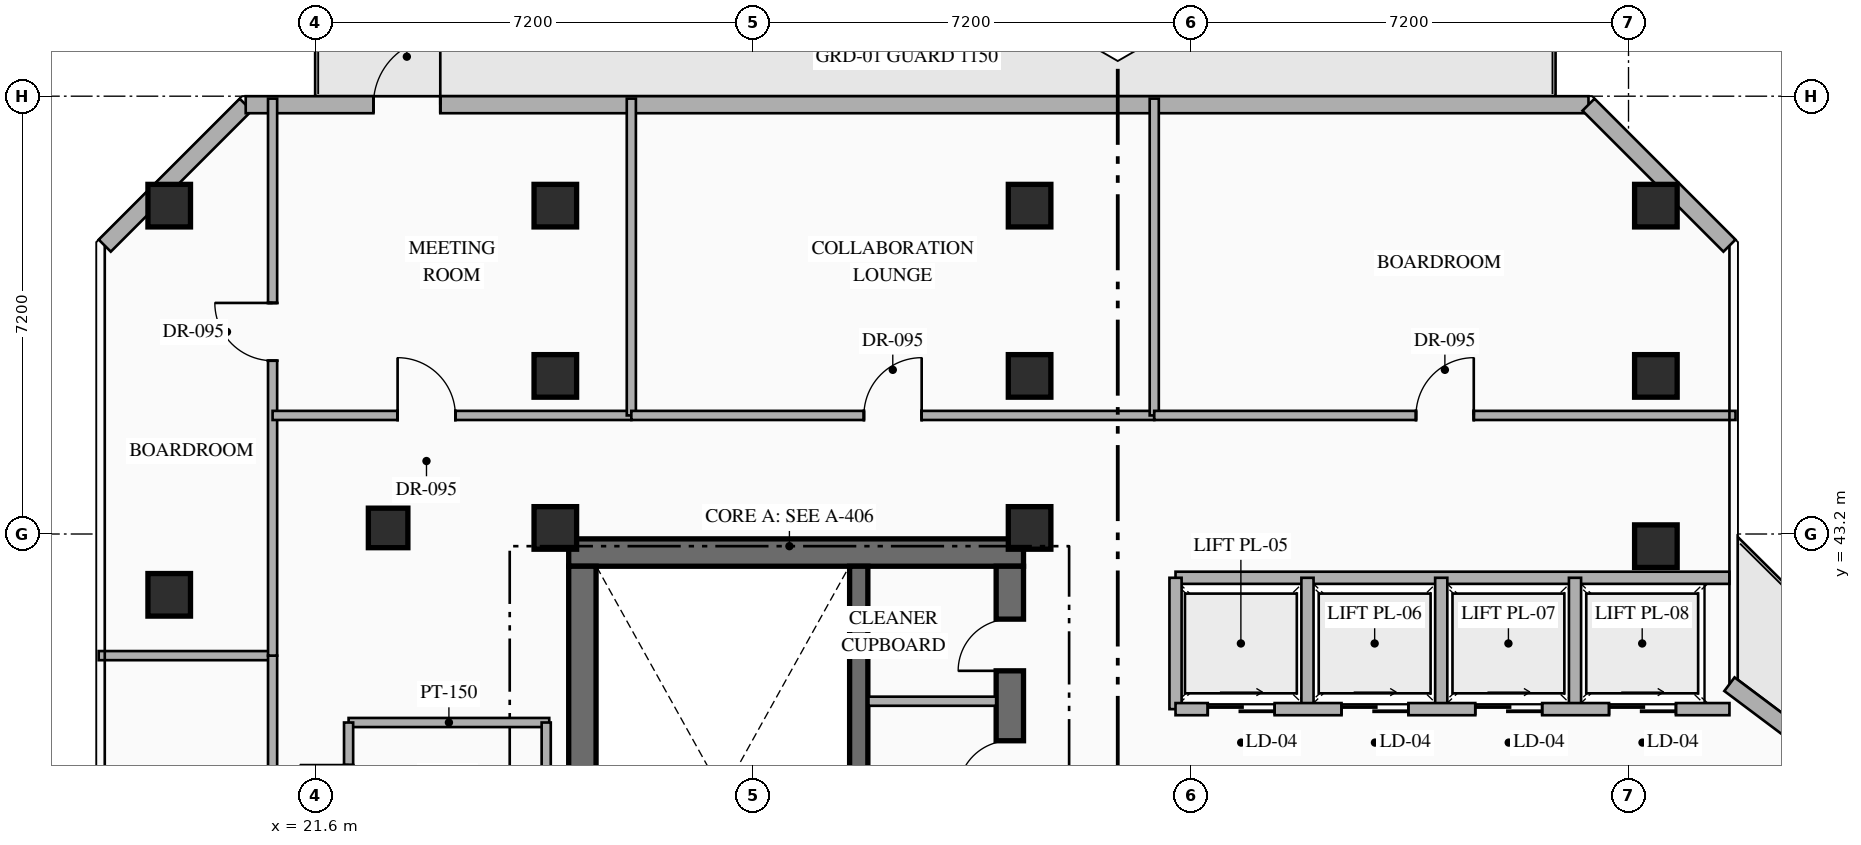
"""IFC4 building model, lengths in metres.
Left out: names, types, materials, properties, quantities, classifications, styles, units other than length and angle.
Written with IfcOpenShell. Run it as: python <this file> out.ifc"""

import sys

from ifc_helpers import new_model, si_unit, direction, frame, frame_2d, origin, origin_2d, place, context, subcontext, project, spatial, rectangle, hollow_rectangle, extrude, element, fill, save


model = new_model("IFC4")
c1 = context("Model", 3, precision=1e-05, world=origin(), true_north=direction((0.0, 1.0)))
c2 = subcontext(c1, "Body", "Model", "MODEL_VIEW")
j1 = project(units=[si_unit("LENGTHUNIT", "METRE"), si_unit("PLANEANGLEUNIT", "RADIAN")], contexts=[c1])
p1 = place(None, origin())
s1 = spatial("IfcSite", under=j1, at=p1, CompositionType="ELEMENT")
p2 = place(p1, origin())
s2 = spatial("IfcBuilding", under=s1, at=p2, CompositionType="ELEMENT")
p3 = place(p2, frame((0.0, 0.0, 216.75)))
s3 = spatial("IfcBuildingStorey", under=s2, at=p3, CompositionType="ELEMENT", Elevation=216.75)
p4 = place(p3, frame((25.77, 42.895, 0.0), z_axis=(0.0, 0.0, 1.0), x_axis=(1.0, 0.0, 0.0)))
e1 = element("IfcWall", 1, at=p4, inside=s3, PredefinedType="SHEAR", context=c2, shape_type="SweptSolid", body=[
    extrude(rectangle(XDim=7.48, YDim=0.45, at=frame_2d((3.74, 0.0))), origin(), (0.0, 0.0, 1.0), 3.6),
])
p5 = place(p3, frame((25.995, 33.19, 0.0), z_axis=(0.0, 0.0, 1.0), x_axis=(0.0, 1.0, 0.0)))
e2 = element("IfcWall", 2, at=p5, inside=s3, PredefinedType="SHEAR", context=c2, shape_type="SweptSolid", body=[
    extrude(rectangle(XDim=9.48, YDim=0.45, at=frame_2d((4.74, 0.0))), origin(), (0.0, 0.0, 1.0), 3.6),
])
p6 = place(p3, frame((33.025, 33.19, 0.0), z_axis=(0.0, 0.0, 1.0), x_axis=(0.0, 1.0, 0.0)))
e3 = element("IfcWall", 3, at=p6, inside=s3, PredefinedType="SHEAR", context=c2, shape_type="SweptSolid", body=[
    extrude(rectangle(XDim=9.48, YDim=0.45, at=frame_2d((4.74, 0.0))), origin(), (0.0, 0.0, 1.0), 3.6),
])
p7 = place(p6, frame((3.61, 0.0, 0.0)))
e4 = element("IfcOpeningElement", 4, at=p7, cuts=e3, PredefinedType="OPENING", context=c2, shape_type="SweptSolid", body=[
    extrude(rectangle(XDim=0.85, YDim=2.08, at=frame_2d((0.425, 1.04))), frame((0.0, 0.235, 0.0), z_axis=(0.0, -1.0, 0.0), x_axis=(1.0, 0.0, 0.0)), (0.0, 0.0, 1.0), 0.47),
])
p8 = place(p6, frame((5.76, 0.0, 0.0)))
e5 = element("IfcOpeningElement", 5, at=p8, cuts=e3, PredefinedType="OPENING", context=c2, shape_type="SweptSolid", body=[
    extrude(rectangle(XDim=0.85, YDim=2.08, at=frame_2d((0.425, 1.04))), frame((0.0, 0.235, 0.0), z_axis=(0.0, -1.0, 0.0), x_axis=(1.0, 0.0, 0.0)), (0.0, 0.0, 1.0), 0.47),
])
p9 = place(p6, frame((7.76, 0.0, 0.0)))
e6 = element("IfcOpeningElement", 6, at=p9, cuts=e3, PredefinedType="OPENING", context=c2, shape_type="SweptSolid", body=[
    extrude(rectangle(XDim=0.85, YDim=2.08, at=frame_2d((0.425, 1.04))), frame((0.0, 0.235, 0.0), z_axis=(0.0, -1.0, 0.0), x_axis=(1.0, 0.0, 0.0)), (0.0, 0.0, 1.0), 0.47),
])
p10 = place(p3, frame((30.54, 33.19, 0.0), z_axis=(0.0, 0.0, 1.0), x_axis=(0.0, 1.0, 0.0)))
e7 = element("IfcWall", 7, at=p10, inside=s3, PredefinedType="SHEAR", context=c2, shape_type="SweptSolid", body=[
    extrude(rectangle(XDim=9.48, YDim=0.3, at=frame_2d((4.74, 0.0))), origin(), (0.0, 0.0, 1.0), 3.6),
])
for number, where, z_axis, x_axis in (
    (8, (25.55, 43.3, 0.0), (0.0, 0.0, 1.0), (1.0, 0.0, 0.0)),
    (9, (33.35, 43.3, 0.0), (0.0, 0.0, 1.0), (1.0, 0.0, 0.0)),
    (10, (43.65, 43.0, 0.0), (0.0, 0.0, 1.0), (1.0, 0.0, 0.0)),
    (11, (25.55, 45.8, 0.0), (0.0, 0.0, 1.0), (1.0, 0.0, 0.0)),
    (12, (33.35, 45.8, 0.0), (0.0, 0.0, 1.0), (1.0, 0.0, 0.0)),
    (13, (43.65, 45.8, 0.0), (0.0, 0.0, 1.0), (1.0, 0.0, 0.0)),
    (14, (19.2, 48.6, 0.0), (0.0, 0.0, 1.0), (1.0, 0.0, 0.0)),
    (15, (25.55, 48.6, 0.0), (0.0, 0.0, 1.0), (1.0, 0.0, 0.0)),
    (16, (33.35, 48.6, 0.0), (0.0, 0.0, 1.0), (1.0, 0.0, 0.0)),
    (17, (43.65, 48.6, 0.0), (0.0, 0.0, 1.0), (1.0, 0.0, 0.0)),
    (18, (19.2, 42.2, 0.0), (0.0, 0.0, 1.0), (1.0, 0.0, 0.0)),
):
    element("IfcColumn", number, at=place(p3, frame(where, z_axis=z_axis, x_axis=x_axis)), inside=s3, PredefinedType="COLUMN", context=c2, shape_type="SweptSolid", body=[
        extrude(hollow_rectangle(XDim=0.7, YDim=0.7, WallThickness=0.028, at=origin_2d()), origin(), (0.0, 0.0, 1.0), 3.6),
    ])
p11 = place(p3, frame((22.8, 43.3, 0.0), z_axis=(0.0, 0.0, 1.0), x_axis=(1.0, 0.0, 0.0)))
e19 = element("IfcColumn", 19, at=p11, inside=s3, PredefinedType="COLUMN", context=c2, shape_type="SweptSolid", body=[
    extrude(hollow_rectangle(XDim=0.65, YDim=0.65, WallThickness=0.025, at=origin_2d()), origin(), (0.0, 0.0, 1.0), 3.6),
])
p12 = place(p3, frame((44.86, 40.73, 0.0), z_axis=(0.0, 0.0, 1.0), x_axis=(0.800007624502, -0.599989833863, 0.0)))
e20 = element("IfcWall", 20, at=p12, inside=s3, PredefinedType="STANDARD", context=c2, shape_type="SweptSolid", body=[
    extrude(rectangle(XDim=19.212, YDim=0.28, at=frame_2d((9.606, 0.0))), origin(), (0.0, 0.0, 1.0), 3.35),
])
p13 = place(p12, frame((1.755, 0.0, 0.0)))
e21 = element("IfcOpeningElement", 21, at=p13, cuts=e20, PredefinedType="OPENING", context=c2, shape_type="SweptSolid", body=[
    extrude(rectangle(XDim=1.1, YDim=2.2, at=frame_2d((0.55, 1.1))), frame((0.0, 0.15, 0.0), z_axis=(0.0, -1.0, 0.0), x_axis=(1.0, 0.0, 0.0)), (0.0, 0.0, 1.0), 0.3),
])
p14 = place(p12, frame((13.509, 0.0, 0.85)))
e22 = element("IfcOpeningElement", 22, at=p14, cuts=e20, PredefinedType="OPENING", context=c2, shape_type="SweptSolid", body=[
    extrude(rectangle(XDim=1.8, YDim=2.1, at=frame_2d((0.9, 1.05))), frame((0.0, 0.15, 0.0), z_axis=(0.0, -1.0, 0.0), x_axis=(1.0, 0.0, 0.0)), (0.0, 0.0, 1.0), 0.3),
])
p15 = place(p3, frame((18.14, 47.942, 0.0), z_axis=(0.0, 0.0, 1.0), x_axis=(0.707106781187, 0.707106781187, 0.0)))
e23 = element("IfcWall", 23, at=p15, inside=s3, PredefinedType="STANDARD", context=c2, shape_type="SweptSolid", body=[
    extrude(rectangle(XDim=3.278, YDim=0.28, at=frame_2d((1.639, 0.0))), origin(), (0.0, 0.0, 1.0), 3.35),
])
p16 = place(p3, frame((20.458, 50.26, 0.0), z_axis=(0.0, 0.0, 1.0), x_axis=(1.0, 0.0, 0.0)))
e24 = element("IfcWall", 24, at=p16, inside=s3, PredefinedType="STANDARD", context=c2, shape_type="SweptSolid", body=[
    extrude(rectangle(XDim=22.084, YDim=0.28, at=frame_2d((11.042, 0.0))), origin(), (0.0, 0.0, 1.0), 3.35),
])
p17 = place(p16, frame((2.1, 0.0, 0.0)))
e25 = element("IfcOpeningElement", 25, at=p17, cuts=e24, PredefinedType="OPENING", context=c2, shape_type="SweptSolid", body=[
    extrude(rectangle(XDim=1.1, YDim=2.2, at=frame_2d((0.55, 1.1))), frame((0.0, 0.15, 0.0), z_axis=(0.0, -1.0, 0.0), x_axis=(1.0, 0.0, 0.0)), (0.0, 0.0, 1.0), 0.3),
])
p18 = place(p3, frame((42.542, 50.26, 0.0), z_axis=(0.0, 0.0, 1.0), x_axis=(0.707106781187, -0.707106781187, 0.0)))
e26 = element("IfcWall", 26, at=p18, inside=s3, PredefinedType="STANDARD", context=c2, shape_type="SweptSolid", body=[
    extrude(rectangle(XDim=3.278, YDim=0.28, at=frame_2d((1.639, 0.0))), origin(), (0.0, 0.0, 1.0), 3.35),
])
p19 = place(p3, frame((30.7, 40.45, 0.0), z_axis=(0.0, 0.0, 1.0), x_axis=(1.0, 0.0, 0.0)))
e27 = element("IfcWall", 27, at=p19, inside=s3, PredefinedType="PARTITIONING", context=c2, shape_type="SweptSolid", body=[
    extrude(rectangle(XDim=2.1, YDim=0.15, at=frame_2d((1.05, 0.0))), origin(), (0.0, 0.0, 1.0), 3.35),
])
p20 = place(p3, frame((35.75, 42.48, 0.0), z_axis=(0.0, 0.0, 1.0), x_axis=(1.0, 0.0, 0.0)))
e28 = element("IfcWall", 28, at=p20, inside=s3, PredefinedType="STANDARD", context=c2, shape_type="SweptSolid", body=[
    extrude(rectangle(XDim=9.11, YDim=0.2, at=frame_2d((4.555, 0.0))), origin(), (0.0, 0.0, 1.0), 3.35),
])
for number, where, z_axis, x_axis in (
    (29, (35.75, 40.32, 0.0), (0.0, 0.0, 1.0), (0.0, 1.0, 0.0)),
    (30, (37.92, 40.32, 0.0), (0.0, 0.0, 1.0), (0.0, 1.0, 0.0)),
    (31, (40.12, 40.32, 0.0), (0.0, 0.0, 1.0), (0.0, 1.0, 0.0)),
    (32, (42.32, 40.32, 0.0), (0.0, 0.0, 1.0), (0.0, 1.0, 0.0)),
):
    element("IfcWall", number, at=place(p3, frame(where, z_axis=z_axis, x_axis=x_axis)), inside=s3, PredefinedType="STANDARD", context=c2, shape_type="SweptSolid", body=[
        extrude(rectangle(XDim=2.16, YDim=0.2, at=frame_2d((1.08, 0.0))), origin(), (0.0, 0.0, 1.0), 3.35),
    ])
p21 = place(p3, frame((35.75, 40.32, 0.0), z_axis=(0.0, 0.0, 1.0), x_axis=(1.0, 0.0, 0.0)))
e33 = element("IfcWall", 33, at=p21, inside=s3, PredefinedType="STANDARD", context=c2, shape_type="SweptSolid", body=[
    extrude(rectangle(XDim=9.11, YDim=0.2, at=frame_2d((4.555, 0.0))), origin(), (0.0, 0.0, 1.0), 3.35),
])
p22 = place(p21, frame((0.53, 0.0, 0.0)))
e34 = element("IfcOpeningElement", 34, at=p22, cuts=e33, PredefinedType="OPENING", context=c2, shape_type="SweptSolid", body=[
    extrude(rectangle(XDim=1.1, YDim=2.18, at=frame_2d((0.55, 1.09))), frame((0.0, 0.11, 0.0), z_axis=(0.0, -1.0, 0.0), x_axis=(1.0, 0.0, 0.0)), (0.0, 0.0, 1.0), 0.22),
])
p23 = place(p21, frame((2.73, 0.0, 0.0)))
e35 = element("IfcOpeningElement", 35, at=p23, cuts=e33, PredefinedType="OPENING", context=c2, shape_type="SweptSolid", body=[
    extrude(rectangle(XDim=1.1, YDim=2.18, at=frame_2d((0.55, 1.09))), frame((0.0, 0.11, 0.0), z_axis=(0.0, -1.0, 0.0), x_axis=(1.0, 0.0, 0.0)), (0.0, 0.0, 1.0), 0.22),
])
p24 = place(p21, frame((4.93, 0.0, 0.0)))
e36 = element("IfcOpeningElement", 36, at=p24, cuts=e33, PredefinedType="OPENING", context=c2, shape_type="SweptSolid", body=[
    extrude(rectangle(XDim=1.1, YDim=2.18, at=frame_2d((0.55, 1.09))), frame((0.0, 0.11, 0.0), z_axis=(0.0, -1.0, 0.0), x_axis=(1.0, 0.0, 0.0)), (0.0, 0.0, 1.0), 0.22),
])
p25 = place(p21, frame((7.13, 0.0, 0.0)))
e37 = element("IfcOpeningElement", 37, at=p25, cuts=e33, PredefinedType="OPENING", context=c2, shape_type="SweptSolid", body=[
    extrude(rectangle(XDim=1.1, YDim=2.18, at=frame_2d((0.55, 1.09))), frame((0.0, 0.11, 0.0), z_axis=(0.0, -1.0, 0.0), x_axis=(1.0, 0.0, 0.0)), (0.0, 0.0, 1.0), 0.22),
])
p26 = place(p3, frame((22.15, 40.1, 0.0), z_axis=(0.0, 0.0, 1.0), x_axis=(1.0, 0.0, 0.0)))
e38 = element("IfcWall", 38, at=p26, inside=s3, PredefinedType="PARTITIONING", context=c2, shape_type="SweptSolid", body=[
    extrude(rectangle(XDim=3.3, YDim=0.15, at=frame_2d((1.65, 0.0))), origin(), (0.0, 0.0, 1.0), 3.35),
])
p27 = place(p3, frame((25.4, 33.5, 0.0), z_axis=(0.0, 0.0, 1.0), x_axis=(0.0, 1.0, 0.0)))
e39 = element("IfcWall", 39, at=p27, inside=s3, PredefinedType="PARTITIONING", context=c2, shape_type="SweptSolid", body=[
    extrude(rectangle(XDim=6.6, YDim=0.15, at=frame_2d((3.3, 0.0))), origin(), (0.0, 0.0, 1.0), 3.35),
])
p28 = place(p3, frame((22.15, 37.9, 0.0), z_axis=(0.0, 0.0, 1.0), x_axis=(0.0, 1.0, 0.0)))
e40 = element("IfcWall", 40, at=p28, inside=s3, PredefinedType="PARTITIONING", context=c2, shape_type="SweptSolid", body=[
    extrude(rectangle(XDim=2.2, YDim=0.15, at=frame_2d((1.1, 0.0))), origin(), (0.0, 0.0, 1.0), 3.35),
])
p29 = place(p28, frame((0.7, 0.0, 0.0)))
e41 = element("IfcOpeningElement", 41, at=p29, cuts=e40, PredefinedType="OPENING", context=c2, shape_type="SweptSolid", body=[
    extrude(rectangle(XDim=0.8, YDim=2.06, at=frame_2d((0.4, 1.03))), frame((0.0, 0.085, 0.0), z_axis=(0.0, -1.0, 0.0), x_axis=(1.0, 0.0, 0.0)), (0.0, 0.0, 1.0), 0.17),
])
p30 = place(p3, frame((18.04, 41.2, 0.0), z_axis=(0.0, 0.0, 1.0), x_axis=(1.0, 0.0, 0.0)))
e42 = element("IfcWall", 42, at=p30, inside=s3, PredefinedType="PARTITIONING", context=c2, shape_type="SweptSolid", body=[
    extrude(rectangle(XDim=2.86, YDim=0.15, at=frame_2d((1.43, 0.0))), origin(), (0.0, 0.0, 1.0), 3.35),
])
p31 = place(p3, frame((20.9, 31.8, 0.0), z_axis=(0.0, 0.0, 1.0), x_axis=(0.0, 1.0, 0.0)))
e43 = element("IfcWall", 43, at=p31, inside=s3, PredefinedType="PARTITIONING", context=c2, shape_type="SweptSolid", body=[
    extrude(rectangle(XDim=9.4, YDim=0.15, at=frame_2d((4.7, 0.0))), origin(), (0.0, 0.0, 1.0), 3.35),
])
p32 = place(p31, frame((0.38, 0.0, 0.0)))
e44 = element("IfcOpeningElement", 44, at=p32, cuts=e43, PredefinedType="OPENING", context=c2, shape_type="SweptSolid", body=[
    extrude(rectangle(XDim=0.95, YDim=2.15, at=frame_2d((0.475, 1.075))), frame((0.0, 0.085, 0.0), z_axis=(0.0, -1.0, 0.0), x_axis=(1.0, 0.0, 0.0)), (0.0, 0.0, 1.0), 0.17),
])
p33 = place(p3, frame((20.9, 41.2, 0.0), z_axis=(0.0, 0.0, 1.0), x_axis=(0.0, 1.0, 0.0)))
e45 = element("IfcWall", 45, at=p33, inside=s3, PredefinedType="PARTITIONING", context=c2, shape_type="SweptSolid", body=[
    extrude(rectangle(XDim=9.16, YDim=0.15, at=frame_2d((4.58, 0.0))), origin(), (0.0, 0.0, 1.0), 3.35),
])
p34 = place(p33, frame((4.85, 0.0, 0.0)))
e46 = element("IfcOpeningElement", 46, at=p34, cuts=e45, PredefinedType="OPENING", context=c2, shape_type="SweptSolid", body=[
    extrude(rectangle(XDim=0.95, YDim=2.15, at=frame_2d((0.475, 1.075))), frame((0.0, 0.085, 0.0), z_axis=(0.0, -1.0, 0.0), x_axis=(1.0, 0.0, 0.0)), (0.0, 0.0, 1.0), 0.17),
])
p35 = place(p3, frame((20.9, 45.15, 0.0), z_axis=(0.0, 0.0, 1.0), x_axis=(1.0, 0.0, 0.0)))
e47 = element("IfcWall", 47, at=p35, inside=s3, PredefinedType="PARTITIONING", context=c2, shape_type="SweptSolid", body=[
    extrude(rectangle(XDim=5.9, YDim=0.15, at=frame_2d((2.95, 0.0))), origin(), (0.0, 0.0, 1.0), 3.35),
])
p36 = place(p35, frame((2.056, 0.0, 0.0)))
e48 = element("IfcOpeningElement", 48, at=p36, cuts=e47, PredefinedType="OPENING", context=c2, shape_type="SweptSolid", body=[
    extrude(rectangle(XDim=0.95, YDim=2.15, at=frame_2d((0.475, 1.075))), frame((0.0, 0.085, 0.0), z_axis=(0.0, -1.0, 0.0), x_axis=(1.0, 0.0, 0.0)), (0.0, 0.0, 1.0), 0.17),
])
p37 = place(p3, frame((26.8, 45.15, 0.0), z_axis=(0.0, 0.0, 1.0), x_axis=(0.0, 1.0, 0.0)))
e49 = element("IfcWall", 49, at=p37, inside=s3, PredefinedType="PARTITIONING", context=c2, shape_type="SweptSolid", body=[
    extrude(rectangle(XDim=5.21, YDim=0.15, at=frame_2d((2.605, 0.0))), origin(), (0.0, 0.0, 1.0), 3.35),
])
p38 = place(p3, frame((26.8, 45.15, 0.0), z_axis=(0.0, 0.0, 1.0), x_axis=(1.0, 0.0, 0.0)))
e50 = element("IfcWall", 50, at=p38, inside=s3, PredefinedType="PARTITIONING", context=c2, shape_type="SweptSolid", body=[
    extrude(rectangle(XDim=8.6, YDim=0.15, at=frame_2d((4.3, 0.0))), origin(), (0.0, 0.0, 1.0), 3.35),
])
p39 = place(p38, frame((3.825, 0.0, 0.0)))
e51 = element("IfcOpeningElement", 51, at=p39, cuts=e50, PredefinedType="OPENING", context=c2, shape_type="SweptSolid", body=[
    extrude(rectangle(XDim=0.95, YDim=2.15, at=frame_2d((0.475, 1.075))), frame((0.0, 0.085, 0.0), z_axis=(0.0, -1.0, 0.0), x_axis=(1.0, 0.0, 0.0)), (0.0, 0.0, 1.0), 0.17),
])
p40 = place(p3, frame((35.4, 45.15, 0.0), z_axis=(0.0, 0.0, 1.0), x_axis=(0.0, 1.0, 0.0)))
e52 = element("IfcWall", 52, at=p40, inside=s3, PredefinedType="PARTITIONING", context=c2, shape_type="SweptSolid", body=[
    extrude(rectangle(XDim=5.21, YDim=0.15, at=frame_2d((2.605, 0.0))), origin(), (0.0, 0.0, 1.0), 3.35),
])
p41 = place(p3, frame((35.4, 45.15, 0.0), z_axis=(0.0, 0.0, 1.0), x_axis=(1.0, 0.0, 0.0)))
e53 = element("IfcWall", 53, at=p41, inside=s3, PredefinedType="PARTITIONING", context=c2, shape_type="SweptSolid", body=[
    extrude(rectangle(XDim=9.56, YDim=0.15, at=frame_2d((4.78, 0.0))), origin(), (0.0, 0.0, 1.0), 3.35),
])
p42 = place(p41, frame((4.305, 0.0, 0.0)))
e54 = element("IfcOpeningElement", 54, at=p42, cuts=e53, PredefinedType="OPENING", context=c2, shape_type="SweptSolid", body=[
    extrude(rectangle(XDim=0.95, YDim=2.15, at=frame_2d((0.475, 1.075))), frame((0.0, 0.085, 0.0), z_axis=(0.0, -1.0, 0.0), x_axis=(1.0, 0.0, 0.0)), (0.0, 0.0, 1.0), 0.17),
])
p43 = place(p17, origin())
e55 = element("IfcDoor", 55, at=p43, inside=s3, OperationType="SINGLE_SWING_RIGHT", PredefinedType="DOOR", context=c2, shape_type="SweptSolid", body=[
    extrude(rectangle(XDim=1.1, YDim=2.2, at=frame_2d((0.55, 1.1))), frame((0.0, 0.025, 0.0), z_axis=(0.0, -1.0, 0.0), x_axis=(1.0, 0.0, 0.0)), (0.0, 0.0, 1.0), 0.05),
])
fill(e25, e55)
p44 = place(p8, origin())
e56 = element("IfcDoor", 56, at=p44, inside=s3, OperationType="SINGLE_SWING_LEFT", PredefinedType="DOOR", context=c2, shape_type="SweptSolid", body=[
    extrude(rectangle(XDim=0.85, YDim=2.08, at=frame_2d((0.425, 1.04))), frame((0.0, 0.025, 0.0), z_axis=(0.0, -1.0, 0.0), x_axis=(1.0, 0.0, 0.0)), (0.0, 0.0, 1.0), 0.05),
])
fill(e5, e56)
p45 = place(p9, origin())
e57 = element("IfcDoor", 57, at=p45, inside=s3, OperationType="SINGLE_SWING_LEFT", PredefinedType="DOOR", context=c2, shape_type="SweptSolid", body=[
    extrude(rectangle(XDim=0.85, YDim=2.08, at=frame_2d((0.425, 1.04))), frame((0.0, 0.025, 0.0), z_axis=(0.0, -1.0, 0.0), x_axis=(1.0, 0.0, 0.0)), (0.0, 0.0, 1.0), 0.05),
])
fill(e6, e57)
p46 = place(p22, origin())
e58 = element("IfcDoor", 58, at=p46, inside=s3, OperationType="SLIDING_TO_RIGHT", PredefinedType="USERDEFINED", context=c2, shape_type="SweptSolid", body=[
    extrude(rectangle(XDim=1.1, YDim=2.18, at=frame_2d((0.55, 1.09))), frame((0.0, 0.025, 0.0), z_axis=(0.0, -1.0, 0.0), x_axis=(1.0, 0.0, 0.0)), (0.0, 0.0, 1.0), 0.05),
])
fill(e34, e58)
p47 = place(p23, origin())
e59 = element("IfcDoor", 59, at=p47, inside=s3, OperationType="SLIDING_TO_RIGHT", PredefinedType="USERDEFINED", context=c2, shape_type="SweptSolid", body=[
    extrude(rectangle(XDim=1.1, YDim=2.18, at=frame_2d((0.55, 1.09))), frame((0.0, 0.025, 0.0), z_axis=(0.0, -1.0, 0.0), x_axis=(1.0, 0.0, 0.0)), (0.0, 0.0, 1.0), 0.05),
])
fill(e35, e59)
p48 = place(p24, origin())
e60 = element("IfcDoor", 60, at=p48, inside=s3, OperationType="SLIDING_TO_RIGHT", PredefinedType="USERDEFINED", context=c2, shape_type="SweptSolid", body=[
    extrude(rectangle(XDim=1.1, YDim=2.18, at=frame_2d((0.55, 1.09))), frame((0.0, 0.025, 0.0), z_axis=(0.0, -1.0, 0.0), x_axis=(1.0, 0.0, 0.0)), (0.0, 0.0, 1.0), 0.05),
])
fill(e36, e60)
p49 = place(p25, origin())
e61 = element("IfcDoor", 61, at=p49, inside=s3, OperationType="SLIDING_TO_RIGHT", PredefinedType="USERDEFINED", context=c2, shape_type="SweptSolid", body=[
    extrude(rectangle(XDim=1.1, YDim=2.18, at=frame_2d((0.55, 1.09))), frame((0.0, 0.025, 0.0), z_axis=(0.0, -1.0, 0.0), x_axis=(1.0, 0.0, 0.0)), (0.0, 0.0, 1.0), 0.05),
])
fill(e37, e61)
p50 = place(p34, origin())
e62 = element("IfcDoor", 62, at=p50, inside=s3, OperationType="SINGLE_SWING_RIGHT", PredefinedType="DOOR", context=c2, shape_type="SweptSolid", body=[
    extrude(rectangle(XDim=0.95, YDim=2.15, at=frame_2d((0.475, 1.075))), frame((0.0, 0.025, 0.0), z_axis=(0.0, -1.0, 0.0), x_axis=(1.0, 0.0, 0.0)), (0.0, 0.0, 1.0), 0.05),
])
fill(e46, e62)
p51 = place(p36, origin())
e63 = element("IfcDoor", 63, at=p51, inside=s3, OperationType="SINGLE_SWING_LEFT", PredefinedType="DOOR", context=c2, shape_type="SweptSolid", body=[
    extrude(rectangle(XDim=0.95, YDim=2.15, at=frame_2d((0.475, 1.075))), frame((0.0, 0.025, 0.0), z_axis=(0.0, -1.0, 0.0), x_axis=(1.0, 0.0, 0.0)), (0.0, 0.0, 1.0), 0.05),
])
fill(e48, e63)
p52 = place(p39, origin())
e64 = element("IfcDoor", 64, at=p52, inside=s3, OperationType="SINGLE_SWING_RIGHT", PredefinedType="DOOR", context=c2, shape_type="SweptSolid", body=[
    extrude(rectangle(XDim=0.95, YDim=2.15, at=frame_2d((0.475, 1.075))), frame((0.0, 0.025, 0.0), z_axis=(0.0, -1.0, 0.0), x_axis=(1.0, 0.0, 0.0)), (0.0, 0.0, 1.0), 0.05),
])
fill(e51, e64)
p53 = place(p42, origin())
e65 = element("IfcDoor", 65, at=p53, inside=s3, OperationType="SINGLE_SWING_RIGHT", PredefinedType="DOOR", context=c2, shape_type="SweptSolid", body=[
    extrude(rectangle(XDim=0.95, YDim=2.15, at=frame_2d((0.475, 1.075))), frame((0.0, 0.025, 0.0), z_axis=(0.0, -1.0, 0.0), x_axis=(1.0, 0.0, 0.0)), (0.0, 0.0, 1.0), 0.05),
])
fill(e54, e65)
save(model, sys.argv[1])
